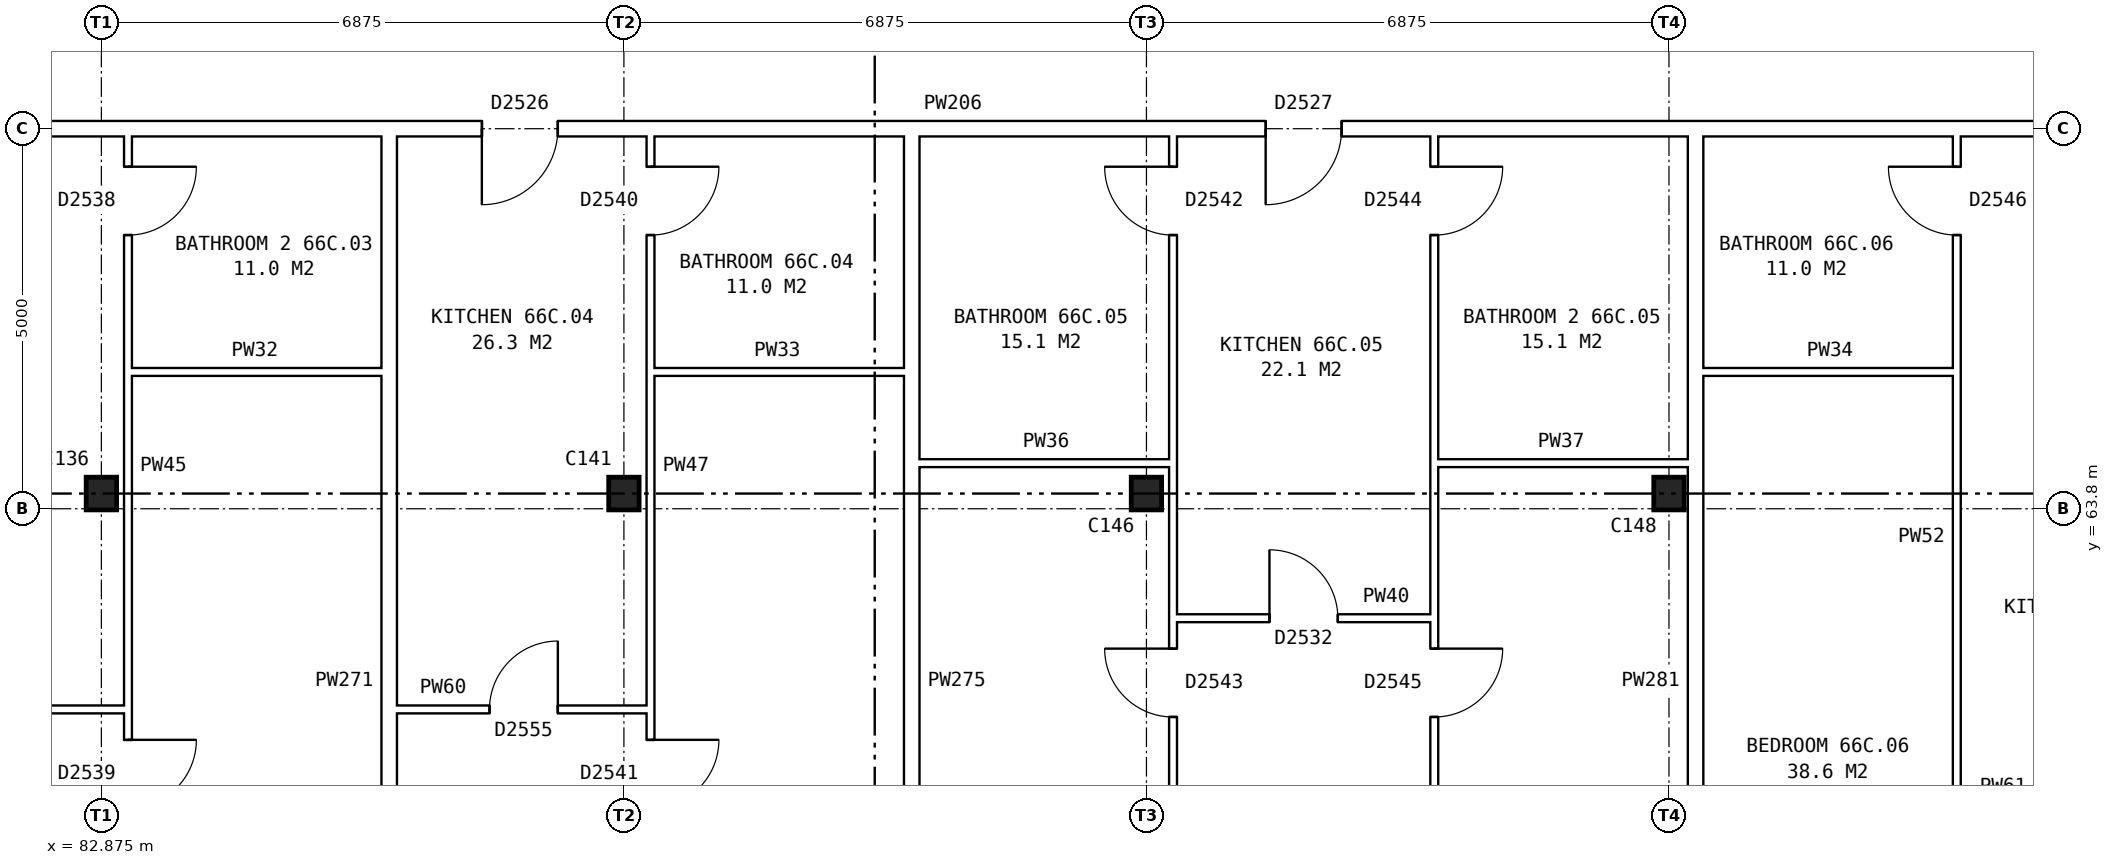
"""IFC4 building model, lengths in metres.
Left out: names, types, materials, properties, quantities, classifications, styles, units other than length and angle.
Written with IfcOpenShell. Run it as: python <this file> out.ifc"""

import sys

from ifc_helpers import new_model, si_unit, direction, frame, frame_2d, origin, origin_2d, place, context, subcontext, project, spatial, rectangle, i_section, extrude, element, fill, save


model = new_model("IFC4")
c1 = context("Model", 3, precision=1e-05, world=origin(), true_north=direction((0.0, 1.0)))
c2 = subcontext(c1, "Body", "Model", "MODEL_VIEW")
j1 = project(units=[si_unit("LENGTHUNIT", "METRE"), si_unit("PLANEANGLEUNIT", "RADIAN")], contexts=[c1])
p1 = place(None, origin())
s1 = spatial("IfcSite", under=j1, at=p1, CompositionType="ELEMENT")
p2 = place(p1, origin())
s2 = spatial("IfcBuilding", under=s1, at=p2, CompositionType="ELEMENT")
p3 = place(p2, frame((0.0, 0.0, 233.8)))
s3 = spatial("IfcBuildingStorey", under=s2, at=p3, CompositionType="ELEMENT", Elevation=233.8)
for number, where, z_axis, x_axis in (
    (1, (82.875, 64.0, 0.0), (0.0, 0.0, 1.0), (1.0, 0.0, 0.0)),
    (2, (89.75, 64.0, 0.0), (0.0, 0.0, 1.0), (1.0, 0.0, 0.0)),
    (3, (96.625, 64.0, 0.0), (0.0, 0.0, 1.0), (1.0, 0.0, 0.0)),
    (4, (103.5, 64.0, 0.0), (0.0, 0.0, 1.0), (1.0, 0.0, 0.0)),
):
    element("IfcColumn", number, at=place(p3, frame(where, z_axis=z_axis, x_axis=x_axis)), inside=s3, PredefinedType="COLUMN", context=c2, shape_type="SweptSolid", body=[
        extrude(i_section(OverallWidth=0.4, OverallDepth=0.43, WebThickness=0.028, FlangeThickness=0.04, at=origin_2d()), origin(), (0.0, 0.0, 1.0), 2.85),
    ])
p4 = place(p3, frame((79.438, 61.16, 0.0), z_axis=(0.0, 0.0, 1.0), x_axis=(1.0, 0.0, 0.0)))
e5 = element("IfcWall", 5, at=p4, inside=s3, PredefinedType="PARTITIONING", context=c2, shape_type="SweptSolid", body=[
    extrude(rectangle(XDim=3.787, YDim=0.1, at=frame_2d((1.894, 0.0))), origin(), (0.0, 0.0, 1.0), 2.85),
])
p5 = place(p4, frame((1.444, 0.0, 0.0)))
e6 = element("IfcOpeningElement", 6, at=p5, cuts=e5, PredefinedType="OPENING", context=c2, shape_type="SweptSolid", body=[
    extrude(rectangle(XDim=0.9, YDim=2.1, at=frame_2d((0.45, 1.05))), frame((0.0, 0.06, 0.0), z_axis=(0.0, -1.0, 0.0), x_axis=(1.0, 0.0, 0.0)), (0.0, 0.0, 1.0), 0.12),
])
p6 = place(p3, frame((86.762, 61.16, 0.0), z_axis=(0.0, 0.0, 1.0), x_axis=(1.0, 0.0, 0.0)))
e7 = element("IfcWall", 7, at=p6, inside=s3, PredefinedType="PARTITIONING", context=c2, shape_type="SweptSolid", body=[
    extrude(rectangle(XDim=3.338, YDim=0.1, at=frame_2d((1.669, 0.0))), origin(), (0.0, 0.0, 1.0), 2.85),
])
p7 = place(p6, frame((1.219, 0.0, 0.0)))
e8 = element("IfcOpeningElement", 8, at=p7, cuts=e7, PredefinedType="OPENING", context=c2, shape_type="SweptSolid", body=[
    extrude(rectangle(XDim=0.9, YDim=2.1, at=frame_2d((0.45, 1.05))), frame((0.0, 0.06, 0.0), z_axis=(0.0, -1.0, 0.0), x_axis=(1.0, 0.0, 0.0)), (0.0, 0.0, 1.0), 0.12),
])
p8 = place(p3, frame((96.975, 62.36, 0.0), z_axis=(0.0, 0.0, 1.0), x_axis=(1.0, 0.0, 0.0)))
e9 = element("IfcWall", 9, at=p8, inside=s3, PredefinedType="PARTITIONING", context=c2, shape_type="SweptSolid", body=[
    extrude(rectangle(XDim=3.437, YDim=0.1, at=frame_2d((1.719, 0.0))), origin(), (0.0, 0.0, 1.0), 2.85),
])
p9 = place(p8, frame((1.269, 0.0, 0.0)))
e10 = element("IfcOpeningElement", 10, at=p9, cuts=e9, PredefinedType="OPENING", context=c2, shape_type="SweptSolid", body=[
    extrude(rectangle(XDim=0.9, YDim=2.1, at=frame_2d((0.45, 1.05))), frame((0.0, 0.06, 0.0), z_axis=(0.0, -1.0, 0.0), x_axis=(1.0, 0.0, 0.0)), (0.0, 0.0, 1.0), 0.12),
])
p10 = place(p3, frame((93.637, 64.4, 0.0), z_axis=(0.0, 0.0, 1.0), x_axis=(1.0, 0.0, 0.0)))
e11 = element("IfcWall", 11, at=p10, inside=s3, PredefinedType="PARTITIONING", context=c2, shape_type="SweptSolid", body=[
    extrude(rectangle(XDim=3.338, YDim=0.1, at=frame_2d((1.669, 0.0))), origin(), (0.0, 0.0, 1.0), 2.85),
])
p11 = place(p3, frame((100.412, 64.4, 0.0), z_axis=(0.0, 0.0, 1.0), x_axis=(1.0, 0.0, 0.0)))
e12 = element("IfcWall", 12, at=p11, inside=s3, PredefinedType="PARTITIONING", context=c2, shape_type="SweptSolid", body=[
    extrude(rectangle(XDim=3.338, YDim=0.1, at=frame_2d((1.669, 0.0))), origin(), (0.0, 0.0, 1.0), 2.85),
])
for number, where, z_axis, x_axis in (
    (13, (83.225, 65.6, 0.0), (0.0, 0.0, 1.0), (1.0, 0.0, 0.0)),
    (14, (90.1, 65.6, 0.0), (0.0, 0.0, 1.0), (1.0, 0.0, 0.0)),
):
    element("IfcWall", number, at=place(p3, frame(where, z_axis=z_axis, x_axis=x_axis)), inside=s3, PredefinedType="PARTITIONING", context=c2, shape_type="SweptSolid", body=[
        extrude(rectangle(XDim=3.337, YDim=0.1, at=frame_2d((1.668, 0.0))), origin(), (0.0, 0.0, 1.0), 2.85),
    ])
p12 = place(p3, frame((103.95, 65.6, 0.0), z_axis=(0.0, 0.0, 1.0), x_axis=(1.0, 0.0, 0.0)))
e15 = element("IfcWall", 15, at=p12, inside=s3, PredefinedType="PARTITIONING", context=c2, shape_type="SweptSolid", body=[
    extrude(rectangle(XDim=3.337, YDim=0.1, at=frame_2d((1.668, 0.0))), origin(), (0.0, 0.0, 1.0), 2.85),
])
p13 = place(p3, frame((75.64, 68.8, 0.0), z_axis=(0.0, 0.0, 1.0), x_axis=(1.0, 0.0, 0.0)))
e16 = element("IfcWall", 16, at=p13, inside=s3, PredefinedType="PARTITIONING", context=c2, shape_type="SweptSolid", body=[
    extrude(rectangle(XDim=55.72, YDim=0.2, at=frame_2d((27.86, 0.0))), origin(), (0.0, 0.0, 1.0), 2.85),
])
p14 = place(p13, frame((5.191, 0.0, 0.0)))
e17 = element("IfcOpeningElement", 17, at=p14, cuts=e16, PredefinedType="OPENING", context=c2, shape_type="SweptSolid", body=[
    extrude(rectangle(XDim=1.0, YDim=2.1, at=frame_2d((0.5, 1.05))), frame((0.0, 0.11, 0.0), z_axis=(0.0, -1.0, 0.0), x_axis=(1.0, 0.0, 0.0)), (0.0, 0.0, 1.0), 0.22),
])
p15 = place(p13, frame((12.241, 0.0, 0.0)))
e18 = element("IfcOpeningElement", 18, at=p15, cuts=e16, PredefinedType="OPENING", context=c2, shape_type="SweptSolid", body=[
    extrude(rectangle(XDim=1.0, YDim=2.1, at=frame_2d((0.5, 1.05))), frame((0.0, 0.11, 0.0), z_axis=(0.0, -1.0, 0.0), x_axis=(1.0, 0.0, 0.0)), (0.0, 0.0, 1.0), 0.22),
])
p16 = place(p13, frame((22.553, 0.0, 0.0)))
e19 = element("IfcOpeningElement", 19, at=p16, cuts=e16, PredefinedType="OPENING", context=c2, shape_type="SweptSolid", body=[
    extrude(rectangle(XDim=1.0, YDim=2.1, at=frame_2d((0.5, 1.05))), frame((0.0, 0.11, 0.0), z_axis=(0.0, -1.0, 0.0), x_axis=(1.0, 0.0, 0.0)), (0.0, 0.0, 1.0), 0.22),
])
p17 = place(p13, frame((32.866, 0.0, 0.0)))
e20 = element("IfcOpeningElement", 20, at=p17, cuts=e16, PredefinedType="OPENING", context=c2, shape_type="SweptSolid", body=[
    extrude(rectangle(XDim=1.0, YDim=2.1, at=frame_2d((0.5, 1.05))), frame((0.0, 0.11, 0.0), z_axis=(0.0, -1.0, 0.0), x_axis=(1.0, 0.0, 0.0)), (0.0, 0.0, 1.0), 0.22),
])
p18 = place(p13, frame((36.303, 0.0, 0.0)))
e21 = element("IfcOpeningElement", 21, at=p18, cuts=e16, PredefinedType="OPENING", context=c2, shape_type="SweptSolid", body=[
    extrude(rectangle(XDim=1.0, YDim=2.1, at=frame_2d((0.5, 1.05))), frame((0.0, 0.11, 0.0), z_axis=(0.0, -1.0, 0.0), x_axis=(1.0, 0.0, 0.0)), (0.0, 0.0, 1.0), 0.22),
])
p19 = place(p13, frame((46.616, 0.0, 0.0)))
e22 = element("IfcOpeningElement", 22, at=p19, cuts=e16, PredefinedType="OPENING", context=c2, shape_type="SweptSolid", body=[
    extrude(rectangle(XDim=1.0, YDim=2.1, at=frame_2d((0.5, 1.05))), frame((0.0, 0.11, 0.0), z_axis=(0.0, -1.0, 0.0), x_axis=(1.0, 0.0, 0.0)), (0.0, 0.0, 1.0), 0.22),
])
p20 = place(p13, frame((53.496, 0.0, 0.0)))
e23 = element("IfcOpeningElement", 23, at=p20, cuts=e16, PredefinedType="OPENING", context=c2, shape_type="SweptSolid", body=[
    extrude(rectangle(XDim=1.0, YDim=2.1, at=frame_2d((0.5, 1.05))), frame((0.0, 0.11, 0.0), z_axis=(0.0, -1.0, 0.0), x_axis=(1.0, 0.0, 0.0)), (0.0, 0.0, 1.0), 0.22),
])
p21 = place(p3, frame((83.225, 54.36, 0.0), z_axis=(0.0, 0.0, 1.0), x_axis=(0.0, 1.0, 0.0)))
e24 = element("IfcWall", 24, at=p21, inside=s3, PredefinedType="PARTITIONING", context=c2, shape_type="SweptSolid", body=[
    extrude(rectangle(XDim=14.34, YDim=0.1, at=frame_2d((7.17, 0.0))), origin(), (0.0, 0.0, 1.0), 2.85),
])
p22 = place(p21, frame((5.5, 0.0, 0.0)))
e25 = element("IfcOpeningElement", 25, at=p22, cuts=e24, PredefinedType="OPENING", context=c2, shape_type="SweptSolid", body=[
    extrude(rectangle(XDim=0.9, YDim=2.1, at=frame_2d((0.45, 1.05))), frame((0.0, 0.06, 0.0), z_axis=(0.0, -1.0, 0.0), x_axis=(1.0, 0.0, 0.0)), (0.0, 0.0, 1.0), 0.12),
])
p23 = place(p21, frame((13.04, 0.0, 0.0)))
e26 = element("IfcOpeningElement", 26, at=p23, cuts=e24, PredefinedType="OPENING", context=c2, shape_type="SweptSolid", body=[
    extrude(rectangle(XDim=0.9, YDim=2.1, at=frame_2d((0.45, 1.05))), frame((0.0, 0.06, 0.0), z_axis=(0.0, -1.0, 0.0), x_axis=(1.0, 0.0, 0.0)), (0.0, 0.0, 1.0), 0.12),
])
p24 = place(p3, frame((86.662, 54.36, 0.0), z_axis=(0.0, 0.0, 1.0), x_axis=(0.0, 1.0, 0.0)))
e27 = element("IfcWall", 27, at=p24, inside=s3, PredefinedType="PARTITIONING", context=c2, shape_type="SweptSolid", body=[
    extrude(rectangle(XDim=14.34, YDim=0.2, at=frame_2d((7.17, 0.0))), origin(), (0.0, 0.0, 1.0), 2.85),
])
p25 = place(p3, frame((90.1, 54.36, 0.0), z_axis=(0.0, 0.0, 1.0), x_axis=(0.0, 1.0, 0.0)))
e28 = element("IfcWall", 28, at=p25, inside=s3, PredefinedType="PARTITIONING", context=c2, shape_type="SweptSolid", body=[
    extrude(rectangle(XDim=14.34, YDim=0.1, at=frame_2d((7.17, 0.0))), origin(), (0.0, 0.0, 1.0), 2.85),
])
p26 = place(p25, frame((5.5, 0.0, 0.0)))
e29 = element("IfcOpeningElement", 29, at=p26, cuts=e28, PredefinedType="OPENING", context=c2, shape_type="SweptSolid", body=[
    extrude(rectangle(XDim=0.9, YDim=2.1, at=frame_2d((0.45, 1.05))), frame((0.0, 0.06, 0.0), z_axis=(0.0, -1.0, 0.0), x_axis=(1.0, 0.0, 0.0)), (0.0, 0.0, 1.0), 0.12),
])
p27 = place(p25, frame((13.04, 0.0, 0.0)))
e30 = element("IfcOpeningElement", 30, at=p27, cuts=e28, PredefinedType="OPENING", context=c2, shape_type="SweptSolid", body=[
    extrude(rectangle(XDim=0.9, YDim=2.1, at=frame_2d((0.45, 1.05))), frame((0.0, 0.06, 0.0), z_axis=(0.0, -1.0, 0.0), x_axis=(1.0, 0.0, 0.0)), (0.0, 0.0, 1.0), 0.12),
])
p28 = place(p3, frame((93.537, 54.36, 0.0), z_axis=(0.0, 0.0, 1.0), x_axis=(0.0, 1.0, 0.0)))
e31 = element("IfcWall", 31, at=p28, inside=s3, PredefinedType="PARTITIONING", context=c2, shape_type="SweptSolid", body=[
    extrude(rectangle(XDim=14.34, YDim=0.2, at=frame_2d((7.17, 0.0))), origin(), (0.0, 0.0, 1.0), 2.85),
])
p29 = place(p3, frame((96.975, 54.36, 0.0), z_axis=(0.0, 0.0, 1.0), x_axis=(0.0, 1.0, 0.0)))
e32 = element("IfcWall", 32, at=p29, inside=s3, PredefinedType="PARTITIONING", context=c2, shape_type="SweptSolid", body=[
    extrude(rectangle(XDim=14.34, YDim=0.1, at=frame_2d((7.17, 0.0))), origin(), (0.0, 0.0, 1.0), 2.85),
])
p30 = place(p29, frame((6.7, 0.0, 0.0)))
e33 = element("IfcOpeningElement", 33, at=p30, cuts=e32, PredefinedType="OPENING", context=c2, shape_type="SweptSolid", body=[
    extrude(rectangle(XDim=0.9, YDim=2.1, at=frame_2d((0.45, 1.05))), frame((0.0, 0.06, 0.0), z_axis=(0.0, -1.0, 0.0), x_axis=(1.0, 0.0, 0.0)), (0.0, 0.0, 1.0), 0.12),
])
p31 = place(p29, frame((13.04, 0.0, 0.0)))
e34 = element("IfcOpeningElement", 34, at=p31, cuts=e32, PredefinedType="OPENING", context=c2, shape_type="SweptSolid", body=[
    extrude(rectangle(XDim=0.9, YDim=2.1, at=frame_2d((0.45, 1.05))), frame((0.0, 0.06, 0.0), z_axis=(0.0, -1.0, 0.0), x_axis=(1.0, 0.0, 0.0)), (0.0, 0.0, 1.0), 0.12),
])
p32 = place(p3, frame((100.412, 54.36, 0.0), z_axis=(0.0, 0.0, 1.0), x_axis=(0.0, 1.0, 0.0)))
e35 = element("IfcWall", 35, at=p32, inside=s3, PredefinedType="PARTITIONING", context=c2, shape_type="SweptSolid", body=[
    extrude(rectangle(XDim=14.34, YDim=0.1, at=frame_2d((7.17, 0.0))), origin(), (0.0, 0.0, 1.0), 2.85),
])
p33 = place(p32, frame((6.7, 0.0, 0.0)))
e36 = element("IfcOpeningElement", 36, at=p33, cuts=e35, PredefinedType="OPENING", context=c2, shape_type="SweptSolid", body=[
    extrude(rectangle(XDim=0.9, YDim=2.1, at=frame_2d((0.45, 1.05))), frame((0.0, 0.06, 0.0), z_axis=(0.0, -1.0, 0.0), x_axis=(1.0, 0.0, 0.0)), (0.0, 0.0, 1.0), 0.12),
])
p34 = place(p32, frame((13.04, 0.0, 0.0)))
e37 = element("IfcOpeningElement", 37, at=p34, cuts=e35, PredefinedType="OPENING", context=c2, shape_type="SweptSolid", body=[
    extrude(rectangle(XDim=0.9, YDim=2.1, at=frame_2d((0.45, 1.05))), frame((0.0, 0.06, 0.0), z_axis=(0.0, -1.0, 0.0), x_axis=(1.0, 0.0, 0.0)), (0.0, 0.0, 1.0), 0.12),
])
p35 = place(p3, frame((103.85, 54.36, 0.0), z_axis=(0.0, 0.0, 1.0), x_axis=(0.0, 1.0, 0.0)))
e38 = element("IfcWall", 38, at=p35, inside=s3, PredefinedType="PARTITIONING", context=c2, shape_type="SweptSolid", body=[
    extrude(rectangle(XDim=14.34, YDim=0.2, at=frame_2d((7.17, 0.0))), origin(), (0.0, 0.0, 1.0), 2.85),
])
p36 = place(p3, frame((107.287, 54.36, 0.0), z_axis=(0.0, 0.0, 1.0), x_axis=(0.0, 1.0, 0.0)))
e39 = element("IfcWall", 39, at=p36, inside=s3, PredefinedType="PARTITIONING", context=c2, shape_type="SweptSolid", body=[
    extrude(rectangle(XDim=14.34, YDim=0.1, at=frame_2d((7.17, 0.0))), origin(), (0.0, 0.0, 1.0), 2.85),
])
p37 = place(p36, frame((4.2, 0.0, 0.0)))
e40 = element("IfcOpeningElement", 40, at=p37, cuts=e39, PredefinedType="OPENING", context=c2, shape_type="SweptSolid", body=[
    extrude(rectangle(XDim=0.9, YDim=2.1, at=frame_2d((0.45, 1.05))), frame((0.0, 0.06, 0.0), z_axis=(0.0, -1.0, 0.0), x_axis=(1.0, 0.0, 0.0)), (0.0, 0.0, 1.0), 0.12),
])
p38 = place(p36, frame((13.04, 0.0, 0.0)))
e41 = element("IfcOpeningElement", 41, at=p38, cuts=e39, PredefinedType="OPENING", context=c2, shape_type="SweptSolid", body=[
    extrude(rectangle(XDim=0.9, YDim=2.1, at=frame_2d((0.45, 1.05))), frame((0.0, 0.06, 0.0), z_axis=(0.0, -1.0, 0.0), x_axis=(1.0, 0.0, 0.0)), (0.0, 0.0, 1.0), 0.12),
])
p39 = place(p22, frame((0.9, 0.0, 0.0), z_axis=(0.0, 0.0, 1.0), x_axis=(-1.0, 0.0, 0.0)))
e42 = element("IfcDoor", 42, at=p39, inside=s3, OperationType="SINGLE_SWING_LEFT", PredefinedType="DOOR", context=c2, shape_type="SweptSolid", body=[
    extrude(rectangle(XDim=0.9, YDim=2.1, at=frame_2d((0.45, 1.05))), frame((0.0, 0.025, 0.0), z_axis=(0.0, -1.0, 0.0), x_axis=(1.0, 0.0, 0.0)), (0.0, 0.0, 1.0), 0.05),
])
fill(e25, e42)
p40 = place(p23, frame((0.9, 0.0, 0.0), z_axis=(0.0, 0.0, 1.0), x_axis=(-1.0, 0.0, 0.0)))
e43 = element("IfcDoor", 43, at=p40, inside=s3, OperationType="SINGLE_SWING_LEFT", PredefinedType="DOOR", context=c2, shape_type="SweptSolid", body=[
    extrude(rectangle(XDim=0.9, YDim=2.1, at=frame_2d((0.45, 1.05))), frame((0.0, 0.025, 0.0), z_axis=(0.0, -1.0, 0.0), x_axis=(1.0, 0.0, 0.0)), (0.0, 0.0, 1.0), 0.05),
])
fill(e26, e43)
p41 = place(p26, frame((0.9, 0.0, 0.0), z_axis=(0.0, 0.0, 1.0), x_axis=(-1.0, 0.0, 0.0)))
e44 = element("IfcDoor", 44, at=p41, inside=s3, OperationType="SINGLE_SWING_LEFT", PredefinedType="DOOR", context=c2, shape_type="SweptSolid", body=[
    extrude(rectangle(XDim=0.9, YDim=2.1, at=frame_2d((0.45, 1.05))), frame((0.0, 0.025, 0.0), z_axis=(0.0, -1.0, 0.0), x_axis=(1.0, 0.0, 0.0)), (0.0, 0.0, 1.0), 0.05),
])
fill(e29, e44)
p42 = place(p15, frame((1.0, 0.0, 0.0), z_axis=(0.0, 0.0, 1.0), x_axis=(-1.0, 0.0, 0.0)))
e45 = element("IfcDoor", 45, at=p42, inside=s3, OperationType="SINGLE_SWING_RIGHT", PredefinedType="DOOR", context=c2, shape_type="SweptSolid", body=[
    extrude(rectangle(XDim=1.0, YDim=2.1, at=frame_2d((0.5, 1.05))), frame((0.0, 0.025, 0.0), z_axis=(0.0, -1.0, 0.0), x_axis=(1.0, 0.0, 0.0)), (0.0, 0.0, 1.0), 0.05),
])
fill(e18, e45)
p43 = place(p7, origin())
e46 = element("IfcDoor", 46, at=p43, inside=s3, OperationType="SINGLE_SWING_RIGHT", PredefinedType="DOOR", context=c2, shape_type="SweptSolid", body=[
    extrude(rectangle(XDim=0.9, YDim=2.1, at=frame_2d((0.45, 1.05))), frame((0.0, 0.025, 0.0), z_axis=(0.0, -1.0, 0.0), x_axis=(1.0, 0.0, 0.0)), (0.0, 0.0, 1.0), 0.05),
])
fill(e8, e46)
p44 = place(p27, frame((0.9, 0.0, 0.0), z_axis=(0.0, 0.0, 1.0), x_axis=(-1.0, 0.0, 0.0)))
e47 = element("IfcDoor", 47, at=p44, inside=s3, OperationType="SINGLE_SWING_LEFT", PredefinedType="DOOR", context=c2, shape_type="SweptSolid", body=[
    extrude(rectangle(XDim=0.9, YDim=2.1, at=frame_2d((0.45, 1.05))), frame((0.0, 0.025, 0.0), z_axis=(0.0, -1.0, 0.0), x_axis=(1.0, 0.0, 0.0)), (0.0, 0.0, 1.0), 0.05),
])
fill(e30, e47)
p45 = place(p30, origin())
e48 = element("IfcDoor", 48, at=p45, inside=s3, OperationType="SINGLE_SWING_RIGHT", PredefinedType="DOOR", context=c2, shape_type="SweptSolid", body=[
    extrude(rectangle(XDim=0.9, YDim=2.1, at=frame_2d((0.45, 1.05))), frame((0.0, 0.025, 0.0), z_axis=(0.0, -1.0, 0.0), x_axis=(1.0, 0.0, 0.0)), (0.0, 0.0, 1.0), 0.05),
])
fill(e33, e48)
p46 = place(p33, frame((0.9, 0.0, 0.0), z_axis=(0.0, 0.0, 1.0), x_axis=(-1.0, 0.0, 0.0)))
e49 = element("IfcDoor", 49, at=p46, inside=s3, OperationType="SINGLE_SWING_LEFT", PredefinedType="DOOR", context=c2, shape_type="SweptSolid", body=[
    extrude(rectangle(XDim=0.9, YDim=2.1, at=frame_2d((0.45, 1.05))), frame((0.0, 0.025, 0.0), z_axis=(0.0, -1.0, 0.0), x_axis=(1.0, 0.0, 0.0)), (0.0, 0.0, 1.0), 0.05),
])
fill(e36, e49)
p47 = place(p16, frame((1.0, 0.0, 0.0), z_axis=(0.0, 0.0, 1.0), x_axis=(-1.0, 0.0, 0.0)))
e50 = element("IfcDoor", 50, at=p47, inside=s3, OperationType="SINGLE_SWING_RIGHT", PredefinedType="DOOR", context=c2, shape_type="SweptSolid", body=[
    extrude(rectangle(XDim=1.0, YDim=2.1, at=frame_2d((0.5, 1.05))), frame((0.0, 0.025, 0.0), z_axis=(0.0, -1.0, 0.0), x_axis=(1.0, 0.0, 0.0)), (0.0, 0.0, 1.0), 0.05),
])
fill(e19, e50)
p48 = place(p9, origin())
e51 = element("IfcDoor", 51, at=p48, inside=s3, OperationType="SINGLE_SWING_LEFT", PredefinedType="DOOR", context=c2, shape_type="SweptSolid", body=[
    extrude(rectangle(XDim=0.9, YDim=2.1, at=frame_2d((0.45, 1.05))), frame((0.0, 0.025, 0.0), z_axis=(0.0, -1.0, 0.0), x_axis=(1.0, 0.0, 0.0)), (0.0, 0.0, 1.0), 0.05),
])
fill(e10, e51)
p49 = place(p31, origin())
e52 = element("IfcDoor", 52, at=p49, inside=s3, OperationType="SINGLE_SWING_RIGHT", PredefinedType="DOOR", context=c2, shape_type="SweptSolid", body=[
    extrude(rectangle(XDim=0.9, YDim=2.1, at=frame_2d((0.45, 1.05))), frame((0.0, 0.025, 0.0), z_axis=(0.0, -1.0, 0.0), x_axis=(1.0, 0.0, 0.0)), (0.0, 0.0, 1.0), 0.05),
])
fill(e34, e52)
p50 = place(p34, frame((0.9, 0.0, 0.0), z_axis=(0.0, 0.0, 1.0), x_axis=(-1.0, 0.0, 0.0)))
e53 = element("IfcDoor", 53, at=p50, inside=s3, OperationType="SINGLE_SWING_LEFT", PredefinedType="DOOR", context=c2, shape_type="SweptSolid", body=[
    extrude(rectangle(XDim=0.9, YDim=2.1, at=frame_2d((0.45, 1.05))), frame((0.0, 0.025, 0.0), z_axis=(0.0, -1.0, 0.0), x_axis=(1.0, 0.0, 0.0)), (0.0, 0.0, 1.0), 0.05),
])
fill(e37, e53)
p51 = place(p38, origin())
e54 = element("IfcDoor", 54, at=p51, inside=s3, OperationType="SINGLE_SWING_RIGHT", PredefinedType="DOOR", context=c2, shape_type="SweptSolid", body=[
    extrude(rectangle(XDim=0.9, YDim=2.1, at=frame_2d((0.45, 1.05))), frame((0.0, 0.025, 0.0), z_axis=(0.0, -1.0, 0.0), x_axis=(1.0, 0.0, 0.0)), (0.0, 0.0, 1.0), 0.05),
])
fill(e41, e54)
save(model, sys.argv[1])
